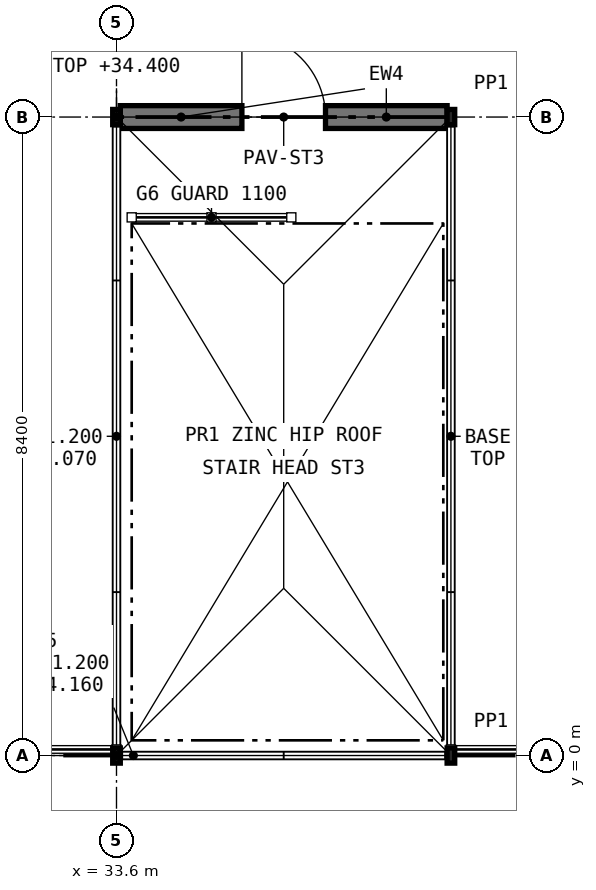
"""IFC4 building model, lengths in metres.
Left out: names, types, materials, properties, quantities, classifications, styles, units other than length and angle.
Written with IfcOpenShell. Run it as: python <this file> out.ifc"""

import sys

from ifc_helpers import new_model, si_unit, direction, frame, frame_2d, origin, origin_2d, place, context, subcontext, project, spatial, rectangle, hollow_rectangle, extrude, element, fill, save


model = new_model("IFC4")
c1 = context("Model", 3, precision=1e-05, world=origin(), true_north=direction((0.0, 1.0)))
c2 = subcontext(c1, "Body", "Model", "MODEL_VIEW")
j1 = project(units=[si_unit("LENGTHUNIT", "METRE"), si_unit("PLANEANGLEUNIT", "RADIAN")], contexts=[c1])
p1 = place(None, origin())
s1 = spatial("IfcSite", under=j1, at=p1, CompositionType="ELEMENT")
p2 = place(p1, origin())
s2 = spatial("IfcBuilding", under=s1, at=p2, CompositionType="ELEMENT")
p3 = place(p2, frame((0.0, 0.0, 31.2)))
s3 = spatial("IfcBuildingStorey", under=s2, at=p3, CompositionType="ELEMENT", Elevation=31.2)
p4 = place(p3, frame((33.6, 0.0, 0.0), z_axis=(0.0, 0.0, 1.0), x_axis=(1.0, 0.0, 0.0)))
e1 = element("IfcColumn", 1, at=p4, inside=s3, PredefinedType="COLUMN", context=c2, shape_type="SweptSolid", body=[
    extrude(hollow_rectangle(XDim=0.1, YDim=0.2, WallThickness=0.008, at=origin_2d()), origin(), (0.0, 0.0, 1.0), 3.2),
])
p5 = place(p3, frame((38.0, 0.0, -0.2), z_axis=(0.0, 0.0, 1.0), x_axis=(1.0, 0.0, 0.0)))
e2 = element("IfcColumn", 2, at=p5, inside=s3, PredefinedType="COLUMN", context=c2, shape_type="SweptSolid", body=[
    extrude(hollow_rectangle(XDim=0.1, YDim=0.2, WallThickness=0.008, at=origin_2d()), origin(), (0.0, 0.0, 1.0), 3.4),
])
p6 = place(p3, frame((33.6, 8.4, 0.0), z_axis=(0.0, 0.0, 1.0), x_axis=(1.0, 0.0, 0.0)))
e3 = element("IfcColumn", 3, at=p6, inside=s3, PredefinedType="COLUMN", context=c2, shape_type="SweptSolid", body=[
    extrude(hollow_rectangle(XDim=0.1, YDim=0.2, WallThickness=0.008, at=origin_2d()), origin(), (0.0, 0.0, 1.0), 3.2),
])
p7 = place(p3, frame((38.0, 8.4, -0.2), z_axis=(0.0, 0.0, 1.0), x_axis=(1.0, 0.0, 0.0)))
e4 = element("IfcColumn", 4, at=p7, inside=s3, PredefinedType="COLUMN", context=c2, shape_type="SweptSolid", body=[
    extrude(hollow_rectangle(XDim=0.1, YDim=0.2, WallThickness=0.008, at=origin_2d()), origin(), (0.0, 0.0, 1.0), 3.4),
])
p8 = place(p3, frame((33.65, 8.4, 0.0), z_axis=(0.0, 0.0, 1.0), x_axis=(1.0, 0.0, 0.0)))
e5 = element("IfcWall", 5, at=p8, inside=s3, PredefinedType="STANDARD", context=c2, shape_type="SweptSolid", body=[
    extrude(rectangle(XDim=4.3, YDim=0.3, at=frame_2d((2.15, 0.0))), origin(), (0.0, 0.0, 1.0), 3.2),
])
p9 = place(p8, frame((1.6, 0.0, 0.0)))
e6 = element("IfcOpeningElement", 6, at=p9, cuts=e5, PredefinedType="OPENING", context=c2, shape_type="SweptSolid", body=[
    extrude(rectangle(XDim=1.1, YDim=2.1, at=frame_2d((0.55, 1.05))), frame((0.0, 0.16, 0.0), z_axis=(0.0, -1.0, 0.0), x_axis=(1.0, 0.0, 0.0)), (0.0, 0.0, 1.0), 0.32),
])
p10 = place(p9, origin())
e7 = element("IfcDoor", 7, at=p10, inside=s3, OperationType="SINGLE_SWING_LEFT", PredefinedType="DOOR", context=c2, shape_type="SweptSolid", body=[
    extrude(rectangle(XDim=1.1, YDim=2.1, at=frame_2d((0.55, 1.05))), frame((0.0, 0.025, 0.0), z_axis=(0.0, -1.0, 0.0), x_axis=(1.0, 0.0, 0.0)), (0.0, 0.0, 1.0), 0.05),
])
fill(e6, e7)
save(model, sys.argv[1])
